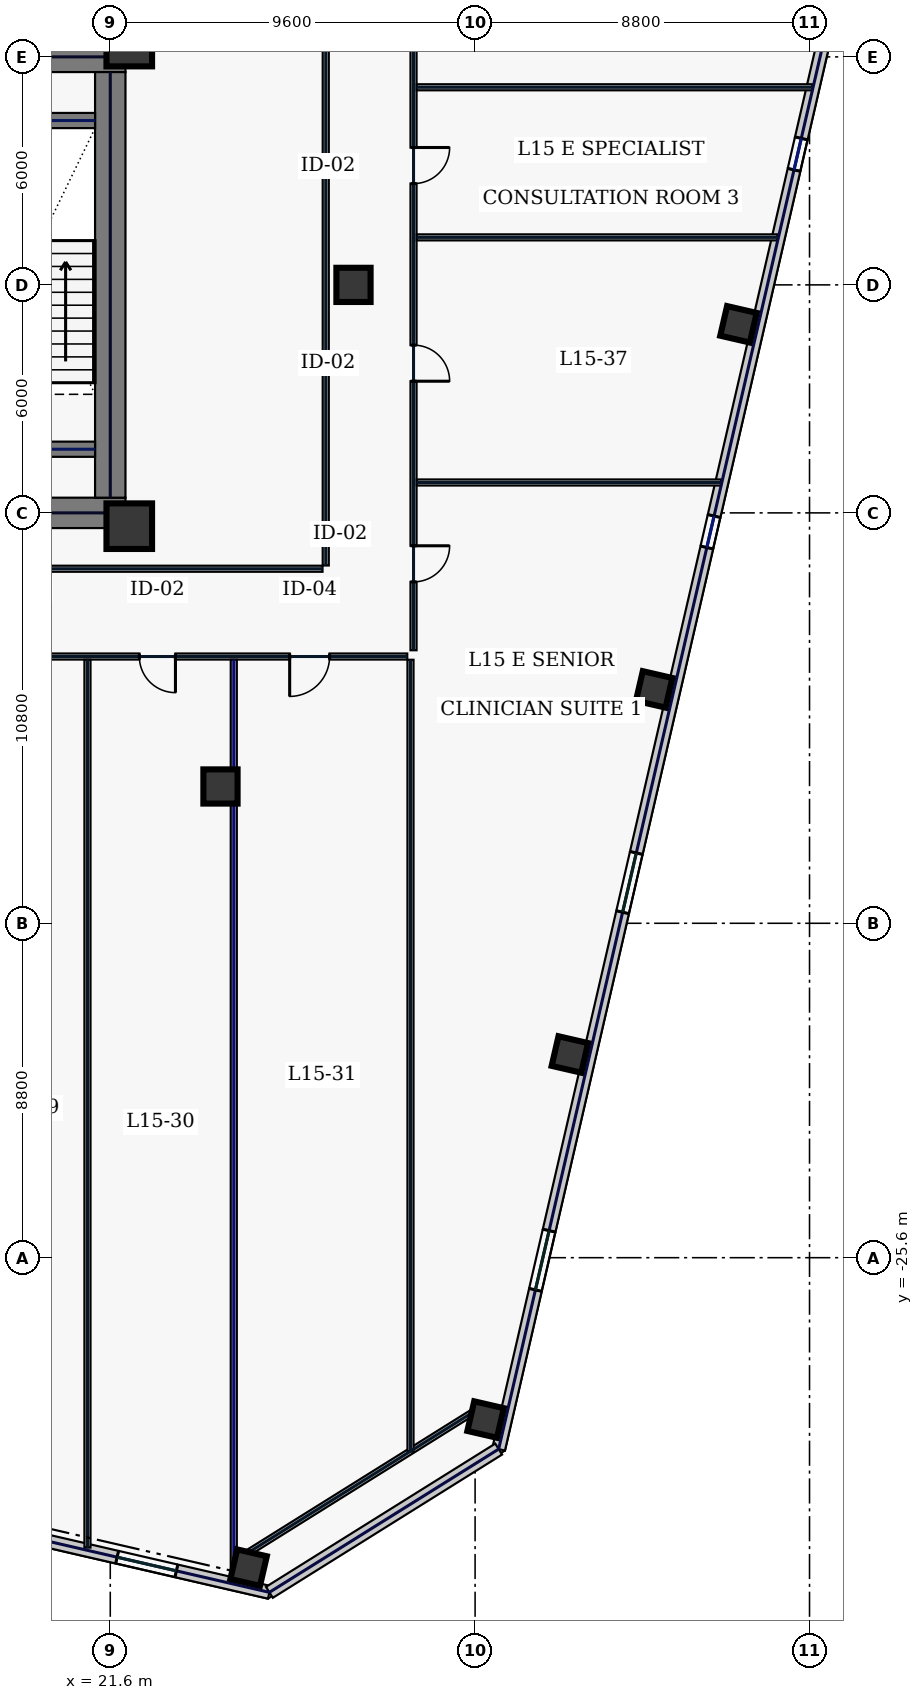
"""IFC4 building model, lengths in metres.
Left out: names, types, materials, properties, quantities, classifications, styles, units other than length and angle.
Written with IfcOpenShell. Run it as: python <this file> out.ifc"""

import sys

from ifc_helpers import new_model, si_unit, direction, frame, frame_2d, origin, origin_2d, place, context, subcontext, project, spatial, rectangle, hollow_rectangle, extrude, element, fill, save


model = new_model("IFC4")
c1 = context("Model", 3, precision=1e-05, world=origin(), true_north=direction((0.0, 1.0)))
c2 = subcontext(c1, "Body", "Model", "MODEL_VIEW")
j1 = project(units=[si_unit("LENGTHUNIT", "METRE"), si_unit("PLANEANGLEUNIT", "RADIAN")], contexts=[c1])
p1 = place(None, origin())
s1 = spatial("IfcSite", under=j1, at=p1, CompositionType="ELEMENT")
p2 = place(p1, origin())
s2 = spatial("IfcBuilding", under=s1, at=p2, CompositionType="ELEMENT")
p3 = place(p2, frame((0.0, 0.0, 71.4)))
s3 = spatial("IfcBuildingStorey", under=s2, at=p3, CompositionType="ELEMENT", Elevation=71.4)
for number, where, z_axis, x_axis in (
    (1, (10.4, 6.0, 0.0), (0.0, 0.0, 1.0), (1.0, 0.0, 0.0)),
    (2, (10.4, -6.0, 0.0), (0.0, 0.0, 1.0), (1.0, 0.0, 0.0)),
):
    element("IfcWall", number, at=place(p3, frame(where, z_axis=z_axis, x_axis=x_axis)), inside=s3, PredefinedType="SHEAR", context=c2, shape_type="SweptSolid", body=[
        extrude(rectangle(XDim=11.6, YDim=0.8, at=frame_2d((5.8, 0.0))), origin(), (0.0, 0.0, 1.0), 3.74),
    ])
p4 = place(p3, frame((21.6, -5.6, 0.0), z_axis=(0.0, 0.0, 1.0), x_axis=(0.0, 1.0, 0.0)))
e3 = element("IfcWall", 3, at=p4, inside=s3, PredefinedType="SHEAR", context=c2, shape_type="SweptSolid", body=[
    extrude(rectangle(XDim=11.2, YDim=0.8, at=frame_2d((5.6, 0.0))), origin(), (0.0, 0.0, 1.0), 3.74),
])
for number, where, z_axis, x_axis in (
    (4, (17.8, -4.325, 0.0), (0.0, 0.0, 1.0), (1.0, 0.0, 0.0)),
    (5, (17.8, 4.325, 0.0), (0.0, 0.0, 1.0), (1.0, 0.0, 0.0)),
):
    element("IfcWall", number, at=place(p3, frame(where, z_axis=z_axis, x_axis=x_axis)), inside=s3, PredefinedType="SHEAR", context=c2, shape_type="SweptSolid", body=[
        extrude(rectangle(XDim=3.4, YDim=0.4, at=frame_2d((1.7, 0.0))), origin(), (0.0, 0.0, 1.0), 3.74),
    ])
for number, where, z_axis, x_axis in (
    (6, (22.1, -6.35, 0.0), (0.0, 0.0, 1.0), (1.0, 0.0, 0.0)),
    (7, (22.1, 6.35, 0.0), (0.0, 0.0, 1.0), (1.0, 0.0, 0.0)),
):
    element("IfcColumn", number, at=place(p3, frame(where, z_axis=z_axis, x_axis=x_axis)), inside=s3, PredefinedType="COLUMN", context=c2, shape_type="SweptSolid", body=[
        extrude(hollow_rectangle(XDim=1.2, YDim=1.2, WallThickness=0.05, at=origin_2d()), origin(), (0.0, 0.0, 1.0), 3.74),
    ])
for number, where, z_axis, x_axis in (
    (8, (24.5, -13.2, 0.0), (0.0, 0.0, 1.0), (1.0, 0.0, 0.0)),
    (9, (28.0, 0.0, 0.0), (0.0, 0.0, 1.0), (1.0, 0.0, 0.0)),
):
    element("IfcColumn", number, at=place(p3, frame(where, z_axis=z_axis, x_axis=x_axis)), inside=s3, PredefinedType="COLUMN", context=c2, shape_type="SweptSolid", body=[
        extrude(hollow_rectangle(XDim=0.9, YDim=0.9, WallThickness=0.04, at=origin_2d()), origin(), (0.0, 0.0, 1.0), 3.74),
    ])
for number, where, z_axis, x_axis in (
    (10, (25.24, -33.757, 0.0), (0.0, 0.0, 1.0), (0.974, -0.225, 0.0)),
    (11, (31.476, -29.86, 0.0), (0.0, 0.0, 1.0), (0.974, -0.225, 0.0)),
    (12, (33.694, -20.252, 0.0), (0.0, 0.0, 1.0), (0.974, -0.225, 0.0)),
    (13, (35.912, -10.645, 0.0), (0.0, 0.0, 1.0), (0.974, -0.225, 0.0)),
    (14, (38.13, -1.038, 0.0), (0.0, 0.0, 1.0), (0.974, -0.225, 0.0)),
):
    element("IfcColumn", number, at=place(p3, frame(where, z_axis=z_axis, x_axis=x_axis)), inside=s3, PredefinedType="COLUMN", context=c2, shape_type="SweptSolid", body=[
        extrude(hollow_rectangle(XDim=0.8, YDim=0.8, WallThickness=0.036, at=origin_2d()), origin(), (0.0, 0.0, 1.0), 3.74),
    ])
p5 = place(p3, frame((3.717, -29.311, 0.0), z_axis=(0.0, 0.0, 1.0), x_axis=(0.97436993772, -0.224951604723, 0.0)))
e15 = element("IfcWall", 15, at=p5, inside=s3, PredefinedType="STANDARD", context=c2, shape_type="SweptSolid", body=[
    extrude(rectangle(XDim=22.651, YDim=0.34, at=frame_2d((11.326, 0.0))), origin(), (0.0, 0.0, 1.0), 3.74),
])
p6 = place(p5, frame((4.306, 0.0, 0.22)))
e16 = element("IfcOpeningElement", 16, at=p6, cuts=e15, PredefinedType="OPENING", context=c2, shape_type="SweptSolid", body=[
    extrude(rectangle(XDim=1.6, YDim=1.2, at=frame_2d((0.8, 0.6))), frame((0.0, 0.18, 0.0), z_axis=(0.0, -1.0, 0.0), x_axis=(1.0, 0.0, 0.0)), (0.0, 0.0, 1.0), 0.36),
])
p7 = place(p5, frame((8.341, 0.0, 0.72)))
e17 = element("IfcOpeningElement", 17, at=p7, cuts=e15, PredefinedType="OPENING", context=c2, shape_type="SweptSolid", body=[
    extrude(rectangle(XDim=0.85, YDim=1.85, at=frame_2d((0.425, 0.925))), frame((0.0, 0.18, 0.0), z_axis=(0.0, -1.0, 0.0), x_axis=(1.0, 0.0, 0.0)), (0.0, 0.0, 1.0), 0.36),
])
p8 = place(p5, frame((15.255, 0.0, 0.72)))
e18 = element("IfcOpeningElement", 18, at=p8, cuts=e15, PredefinedType="OPENING", context=c2, shape_type="SweptSolid", body=[
    extrude(rectangle(XDim=0.85, YDim=1.85, at=frame_2d((0.425, 0.925))), frame((0.0, 0.18, 0.0), z_axis=(0.0, -1.0, 0.0), x_axis=(1.0, 0.0, 0.0)), (0.0, 0.0, 1.0), 0.36),
])
p9 = place(p5, frame((18.539, 0.0, 0.22)))
e19 = element("IfcOpeningElement", 19, at=p9, cuts=e15, PredefinedType="OPENING", context=c2, shape_type="SweptSolid", body=[
    extrude(rectangle(XDim=1.6, YDim=1.2, at=frame_2d((0.8, 0.6))), frame((0.0, 0.18, 0.0), z_axis=(0.0, -1.0, 0.0), x_axis=(1.0, 0.0, 0.0)), (0.0, 0.0, 1.0), 0.36),
])
p10 = place(p3, frame((31.82, -30.637, 0.0), z_axis=(0.0, 0.0, 1.0), x_axis=(0.224949969076, 0.974370315338, 0.0)))
e20 = element("IfcWall", 20, at=p10, inside=s3, PredefinedType="STANDARD", context=c2, shape_type="SweptSolid", body=[
    extrude(rectangle(XDim=40.8, YDim=0.34, at=frame_2d((20.4, 0.0))), origin(), (0.0, 0.0, 1.0), 3.74),
])
p11 = place(p10, frame((4.3, 0.0, 0.58)))
e21 = element("IfcOpeningElement", 21, at=p11, cuts=e20, PredefinedType="OPENING", context=c2, shape_type="SweptSolid", body=[
    extrude(rectangle(XDim=1.6, YDim=2.3, at=frame_2d((0.8, 1.15))), frame((0.0, 0.18, 0.0), z_axis=(0.0, -1.0, 0.0), x_axis=(1.0, 0.0, 0.0)), (0.0, 0.0, 1.0), 0.36),
])
p12 = place(p10, frame((14.5, 0.0, 0.58)))
e22 = element("IfcOpeningElement", 22, at=p12, cuts=e20, PredefinedType="OPENING", context=c2, shape_type="SweptSolid", body=[
    extrude(rectangle(XDim=1.6, YDim=2.3, at=frame_2d((0.8, 1.15))), frame((0.0, 0.18, 0.0), z_axis=(0.0, -1.0, 0.0), x_axis=(1.0, 0.0, 0.0)), (0.0, 0.0, 1.0), 0.36),
])
p13 = place(p10, frame((24.35, 0.0, 0.75)))
e23 = element("IfcOpeningElement", 23, at=p13, cuts=e20, PredefinedType="OPENING", context=c2, shape_type="SweptSolid", body=[
    extrude(rectangle(XDim=0.85, YDim=1.85, at=frame_2d((0.425, 0.925))), frame((0.0, 0.18, 0.0), z_axis=(0.0, -1.0, 0.0), x_axis=(1.0, 0.0, 0.0)), (0.0, 0.0, 1.0), 0.36),
])
p14 = place(p10, frame((34.55, 0.0, 0.75)))
e24 = element("IfcOpeningElement", 24, at=p14, cuts=e20, PredefinedType="OPENING", context=c2, shape_type="SweptSolid", body=[
    extrude(rectangle(XDim=0.85, YDim=1.85, at=frame_2d((0.425, 0.925))), frame((0.0, 0.18, 0.0), z_axis=(0.0, -1.0, 0.0), x_axis=(1.0, 0.0, 0.0)), (0.0, 0.0, 1.0), 0.36),
])
p15 = place(p3, frame((25.788, -34.406, 0.0), z_axis=(0.0, 0.0, 1.0), x_axis=(0.848046504656, 0.529921811158, 0.0)))
e25 = element("IfcWall", 25, at=p15, inside=s3, PredefinedType="STANDARD", context=c2, shape_type="SweptSolid", body=[
    extrude(rectangle(XDim=7.113, YDim=0.34, at=frame_2d((3.557, 0.0))), origin(), (0.0, 0.0, 1.0), 3.74),
])
p16 = place(p3, frame((25.06, -33.468, 0.0), z_axis=(0.0, 0.0, 1.0), x_axis=(0.848043064089, 0.529927317139, 0.0)))
e26 = element("IfcWall", 26, at=p16, inside=s3, PredefinedType="PARTITIONING", context=c2, shape_type="SweptSolid", body=[
    extrude(rectangle(XDim=7.354, YDim=0.16, at=frame_2d((3.677, 0.0))), origin(), (0.0, 0.0, 1.0), 3.74),
])
p17 = place(p3, frame((29.58, 9.665, 0.0), z_axis=(0.0, 0.0, 1.0), x_axis=(0.0, -1.0, 0.0)))
e27 = element("IfcWall", 27, at=p17, inside=s3, PredefinedType="PARTITIONING", context=c2, shape_type="SweptSolid", body=[
    extrude(rectangle(XDim=19.28, YDim=0.16, at=frame_2d((9.64, 0.0))), origin(), (0.0, 0.0, 1.0), 3.74),
])
p18 = place(p17, frame((16.531, 0.0, 0.0)))
e28 = element("IfcOpeningElement", 28, at=p18, cuts=e27, PredefinedType="OPENING", context=c2, shape_type="SweptSolid", body=[
    extrude(rectangle(XDim=0.95, YDim=2.2, at=frame_2d((0.475, 1.1))), frame((0.0, 0.09, 0.0), z_axis=(0.0, -1.0, 0.0), x_axis=(1.0, 0.0, 0.0)), (0.0, 0.0, 1.0), 0.18),
])
p19 = place(p17, frame((11.25, 0.0, 0.0)))
e29 = element("IfcOpeningElement", 29, at=p19, cuts=e27, PredefinedType="OPENING", context=c2, shape_type="SweptSolid", body=[
    extrude(rectangle(XDim=0.95, YDim=2.2, at=frame_2d((0.475, 1.1))), frame((0.0, 0.09, 0.0), z_axis=(0.0, -1.0, 0.0), x_axis=(1.0, 0.0, 0.0)), (0.0, 0.0, 1.0), 0.18),
])
p20 = place(p17, frame((6.05, 0.0, 0.0)))
e30 = element("IfcOpeningElement", 30, at=p20, cuts=e27, PredefinedType="OPENING", context=c2, shape_type="SweptSolid", body=[
    extrude(rectangle(XDim=0.95, YDim=2.2, at=frame_2d((0.475, 1.1))), frame((0.0, 0.09, 0.0), z_axis=(0.0, -1.0, 0.0), x_axis=(1.0, 0.0, 0.0)), (0.0, 0.0, 1.0), 0.18),
])
p21 = place(p17, frame((1.994, 0.0, 0.0)))
e31 = element("IfcOpeningElement", 31, at=p21, cuts=e27, PredefinedType="OPENING", context=c2, shape_type="SweptSolid", body=[
    extrude(rectangle(XDim=0.95, YDim=2.2, at=frame_2d((0.475, 1.1))), frame((0.0, 0.09, 0.0), z_axis=(0.0, -1.0, 0.0), x_axis=(1.0, 0.0, 0.0)), (0.0, 0.0, 1.0), 0.18),
])
p22 = place(p3, frame((29.415, -9.78, 0.0), z_axis=(0.0, 0.0, 1.0), x_axis=(-1.0, 0.0, 0.0)))
e32 = element("IfcWall", 32, at=p22, inside=s3, PredefinedType="PARTITIONING", context=c2, shape_type="SweptSolid", body=[
    extrude(rectangle(XDim=50.65, YDim=0.16, at=frame_2d((25.325, 0.0))), origin(), (0.0, 0.0, 1.0), 3.74),
])
p23 = place(p22, frame((40.5, 0.0, 0.0)))
e33 = element("IfcOpeningElement", 33, at=p23, cuts=e32, PredefinedType="OPENING", context=c2, shape_type="SweptSolid", body=[
    extrude(rectangle(XDim=0.95, YDim=2.2, at=frame_2d((0.475, 1.1))), frame((0.0, 0.09, 0.0), z_axis=(0.0, -1.0, 0.0), x_axis=(1.0, 0.0, 0.0)), (0.0, 0.0, 1.0), 0.18),
])
p24 = place(p22, frame((33.52, 0.0, 0.0)))
e34 = element("IfcOpeningElement", 34, at=p24, cuts=e32, PredefinedType="OPENING", context=c2, shape_type="SweptSolid", body=[
    extrude(rectangle(XDim=0.95, YDim=2.2, at=frame_2d((0.475, 1.1))), frame((0.0, 0.09, 0.0), z_axis=(0.0, -1.0, 0.0), x_axis=(1.0, 0.0, 0.0)), (0.0, 0.0, 1.0), 0.18),
])
p25 = place(p22, frame((26.525, 0.0, 0.0)))
e35 = element("IfcOpeningElement", 35, at=p25, cuts=e32, PredefinedType="OPENING", context=c2, shape_type="SweptSolid", body=[
    extrude(rectangle(XDim=0.95, YDim=2.2, at=frame_2d((0.475, 1.1))), frame((0.0, 0.09, 0.0), z_axis=(0.0, -1.0, 0.0), x_axis=(1.0, 0.0, 0.0)), (0.0, 0.0, 1.0), 0.18),
])
p26 = place(p22, frame((20.75, 0.0, 0.0)))
e36 = element("IfcOpeningElement", 36, at=p26, cuts=e32, PredefinedType="OPENING", context=c2, shape_type="SweptSolid", body=[
    extrude(rectangle(XDim=1.05, YDim=2.2, at=frame_2d((0.525, 1.1))), frame((0.0, 0.09, 0.0), z_axis=(0.0, -1.0, 0.0), x_axis=(1.0, 0.0, 0.0)), (0.0, 0.0, 1.0), 0.18),
])
p27 = place(p22, frame((17.05, 0.0, 0.0)))
e37 = element("IfcOpeningElement", 37, at=p27, cuts=e32, PredefinedType="OPENING", context=c2, shape_type="SweptSolid", body=[
    extrude(rectangle(XDim=0.95, YDim=2.2, at=frame_2d((0.475, 1.1))), frame((0.0, 0.09, 0.0), z_axis=(0.0, -1.0, 0.0), x_axis=(1.0, 0.0, 0.0)), (0.0, 0.0, 1.0), 0.18),
])
p28 = place(p22, frame((13.35, 0.0, 0.0)))
e38 = element("IfcOpeningElement", 38, at=p28, cuts=e32, PredefinedType="OPENING", context=c2, shape_type="SweptSolid", body=[
    extrude(rectangle(XDim=1.15, YDim=2.2, at=frame_2d((0.575, 1.1))), frame((0.0, 0.09, 0.0), z_axis=(0.0, -1.0, 0.0), x_axis=(1.0, 0.0, 0.0)), (0.0, 0.0, 1.0), 0.18),
])
p29 = place(p22, frame((9.65, 0.0, 0.0)))
e39 = element("IfcOpeningElement", 39, at=p29, cuts=e32, PredefinedType="OPENING", context=c2, shape_type="SweptSolid", body=[
    extrude(rectangle(XDim=0.95, YDim=2.2, at=frame_2d((0.475, 1.1))), frame((0.0, 0.09, 0.0), z_axis=(0.0, -1.0, 0.0), x_axis=(1.0, 0.0, 0.0)), (0.0, 0.0, 1.0), 0.18),
])
p30 = place(p22, frame((6.1, 0.0, 0.0)))
e40 = element("IfcOpeningElement", 40, at=p30, cuts=e32, PredefinedType="OPENING", context=c2, shape_type="SweptSolid", body=[
    extrude(rectangle(XDim=0.95, YDim=2.2, at=frame_2d((0.475, 1.1))), frame((0.0, 0.09, 0.0), z_axis=(0.0, -1.0, 0.0), x_axis=(1.0, 0.0, 0.0)), (0.0, 0.0, 1.0), 0.18),
])
p31 = place(p22, frame((2.044, 0.0, 0.0)))
e41 = element("IfcOpeningElement", 41, at=p31, cuts=e32, PredefinedType="OPENING", context=c2, shape_type="SweptSolid", body=[
    extrude(rectangle(XDim=1.05, YDim=2.2, at=frame_2d((0.525, 1.1))), frame((0.0, 0.09, 0.0), z_axis=(0.0, -1.0, 0.0), x_axis=(1.0, 0.0, 0.0)), (0.0, 0.0, 1.0), 0.18),
])
p32 = place(p3, frame((10.665, -7.47, 0.0), z_axis=(0.0, 0.0, 1.0), x_axis=(1.0, 0.0, 0.0)))
e42 = element("IfcWall", 42, at=p32, inside=s3, PredefinedType="PARTITIONING", context=c2, shape_type="SweptSolid", body=[
    extrude(rectangle(XDim=16.52, YDim=0.16, at=frame_2d((8.26, 0.0))), origin(), (0.0, 0.0, 1.0), 3.74),
])
p33 = place(p3, frame((27.27, -7.385, 0.0), z_axis=(0.0, 0.0, 1.0), x_axis=(0.0, 1.0, 0.0)))
e43 = element("IfcWall", 43, at=p33, inside=s3, PredefinedType="PARTITIONING", context=c2, shape_type="SweptSolid", body=[
    extrude(rectangle(XDim=14.82, YDim=0.16, at=frame_2d((7.41, 0.0))), origin(), (0.0, 0.0, 1.0), 3.74),
])
p34 = place(p3, frame((29.5, -30.703, 0.0), z_axis=(0.0, 0.0, 1.0), x_axis=(0.0, 1.0, 0.0)))
e44 = element("IfcWall", 44, at=p34, inside=s3, PredefinedType="PARTITIONING", context=c2, shape_type="SweptSolid", body=[
    extrude(rectangle(XDim=20.838, YDim=0.16, at=frame_2d((10.419, 0.0))), origin(), (0.0, 0.0, 1.0), 3.74),
])
p35 = place(p3, frame((21.0, -33.229, 0.0), z_axis=(0.0, 0.0, 1.0), x_axis=(0.0, 1.0, 0.0)))
e45 = element("IfcWall", 45, at=p35, inside=s3, PredefinedType="PARTITIONING", context=c2, shape_type="SweptSolid", body=[
    extrude(rectangle(XDim=23.365, YDim=0.16, at=frame_2d((11.682, 0.0))), origin(), (0.0, 0.0, 1.0), 3.74),
])
p36 = place(p3, frame((24.85, -34.118, 0.0), z_axis=(0.0, 0.0, 1.0), x_axis=(0.0, 1.0, 0.0)))
e46 = element("IfcWall", 46, at=p36, inside=s3, PredefinedType="PARTITIONING", context=c2, shape_type="SweptSolid", body=[
    extrude(rectangle(XDim=24.253, YDim=0.16, at=frame_2d((12.126, 0.0))), origin(), (0.0, 0.0, 1.0), 3.235),
])
p37 = place(p3, frame((29.665, -5.2, 0.0), z_axis=(0.0, 0.0, 1.0), x_axis=(1.0, 0.0, 0.0)))
e47 = element("IfcWall", 47, at=p37, inside=s3, PredefinedType="PARTITIONING", context=c2, shape_type="SweptSolid", body=[
    extrude(rectangle(XDim=8.007, YDim=0.16, at=frame_2d((4.003, 0.0))), origin(), (0.0, 0.0, 1.0), 3.74),
])
p38 = place(p3, frame((29.665, 1.25, 0.0), z_axis=(0.0, 0.0, 1.0), x_axis=(1.0, 0.0, 0.0)))
e48 = element("IfcWall", 48, at=p38, inside=s3, PredefinedType="PARTITIONING", context=c2, shape_type="SweptSolid", body=[
    extrude(rectangle(XDim=9.496, YDim=0.16, at=frame_2d((4.748, 0.0))), origin(), (0.0, 0.0, 1.0), 3.74),
])
p39 = place(p3, frame((29.665, 5.2, 0.0), z_axis=(0.0, 0.0, 1.0), x_axis=(1.0, 0.0, 0.0)))
e49 = element("IfcWall", 49, at=p39, inside=s3, PredefinedType="PARTITIONING", context=c2, shape_type="SweptSolid", body=[
    extrude(rectangle(XDim=10.408, YDim=0.16, at=frame_2d((5.204, 0.0))), origin(), (0.0, 0.0, 1.0), 3.74),
])
p40 = place(p9, origin())
e50 = element("IfcWindow", 50, at=p40, inside=s3, PartitioningType="SINGLE_PANEL", PredefinedType="WINDOW", context=c2, shape_type="SweptSolid", body=[
    extrude(rectangle(XDim=1.6, YDim=1.2, at=frame_2d((0.8, 0.6))), frame((0.0, 0.03, 0.0), z_axis=(0.0, -1.0, 0.0), x_axis=(1.0, 0.0, 0.0)), (0.0, 0.0, 1.0), 0.06),
])
fill(e19, e50)
p41 = place(p11, origin())
e51 = element("IfcWindow", 51, at=p41, inside=s3, PartitioningType="SINGLE_PANEL", PredefinedType="WINDOW", context=c2, shape_type="SweptSolid", body=[
    extrude(rectangle(XDim=1.6, YDim=2.3, at=frame_2d((0.8, 1.15))), frame((0.0, 0.03, 0.0), z_axis=(0.0, -1.0, 0.0), x_axis=(1.0, 0.0, 0.0)), (0.0, 0.0, 1.0), 0.06),
])
fill(e21, e51)
p42 = place(p12, origin())
e52 = element("IfcWindow", 52, at=p42, inside=s3, PartitioningType="SINGLE_PANEL", PredefinedType="WINDOW", context=c2, shape_type="SweptSolid", body=[
    extrude(rectangle(XDim=1.6, YDim=2.3, at=frame_2d((0.8, 1.15))), frame((0.0, 0.03, 0.0), z_axis=(0.0, -1.0, 0.0), x_axis=(1.0, 0.0, 0.0)), (0.0, 0.0, 1.0), 0.06),
])
fill(e22, e52)
p43 = place(p13, origin())
e53 = element("IfcWindow", 53, at=p43, inside=s3, PartitioningType="SINGLE_PANEL", PredefinedType="WINDOW", context=c2, shape_type="SweptSolid", body=[
    extrude(rectangle(XDim=0.85, YDim=1.85, at=frame_2d((0.425, 0.925))), frame((0.0, 0.03, 0.0), z_axis=(0.0, -1.0, 0.0), x_axis=(1.0, 0.0, 0.0)), (0.0, 0.0, 1.0), 0.06),
])
fill(e23, e53)
p44 = place(p14, origin())
e54 = element("IfcWindow", 54, at=p44, inside=s3, PartitioningType="SINGLE_PANEL", PredefinedType="WINDOW", context=c2, shape_type="SweptSolid", body=[
    extrude(rectangle(XDim=0.85, YDim=1.85, at=frame_2d((0.425, 0.925))), frame((0.0, 0.03, 0.0), z_axis=(0.0, -1.0, 0.0), x_axis=(1.0, 0.0, 0.0)), (0.0, 0.0, 1.0), 0.06),
])
fill(e24, e54)
p45 = place(p30, origin())
e55 = element("IfcDoor", 55, at=p45, inside=s3, OperationType="SINGLE_SWING_LEFT", PredefinedType="DOOR", context=c2, shape_type="SweptSolid", body=[
    extrude(rectangle(XDim=0.95, YDim=2.2, at=frame_2d((0.475, 1.1))), frame((0.0, 0.025, 0.0), z_axis=(0.0, -1.0, 0.0), x_axis=(1.0, 0.0, 0.0)), (0.0, 0.0, 1.0), 0.05),
])
fill(e40, e55)
p46 = place(p31, origin())
e56 = element("IfcDoor", 56, at=p46, inside=s3, OperationType="SINGLE_SWING_RIGHT", PredefinedType="DOOR", context=c2, shape_type="SweptSolid", body=[
    extrude(rectangle(XDim=1.05, YDim=2.2, at=frame_2d((0.525, 1.1))), frame((0.0, 0.025, 0.0), z_axis=(0.0, -1.0, 0.0), x_axis=(1.0, 0.0, 0.0)), (0.0, 0.0, 1.0), 0.05),
])
fill(e41, e56)
p47 = place(p18, origin())
e57 = element("IfcDoor", 57, at=p47, inside=s3, OperationType="SINGLE_SWING_LEFT", PredefinedType="DOOR", context=c2, shape_type="SweptSolid", body=[
    extrude(rectangle(XDim=0.95, YDim=2.2, at=frame_2d((0.475, 1.1))), frame((0.0, 0.025, 0.0), z_axis=(0.0, -1.0, 0.0), x_axis=(1.0, 0.0, 0.0)), (0.0, 0.0, 1.0), 0.05),
])
fill(e28, e57)
p48 = place(p19, origin())
e58 = element("IfcDoor", 58, at=p48, inside=s3, OperationType="SINGLE_SWING_RIGHT", PredefinedType="DOOR", context=c2, shape_type="SweptSolid", body=[
    extrude(rectangle(XDim=0.95, YDim=2.2, at=frame_2d((0.475, 1.1))), frame((0.0, 0.025, 0.0), z_axis=(0.0, -1.0, 0.0), x_axis=(1.0, 0.0, 0.0)), (0.0, 0.0, 1.0), 0.05),
])
fill(e29, e58)
p49 = place(p20, origin())
e59 = element("IfcDoor", 59, at=p49, inside=s3, OperationType="SINGLE_SWING_LEFT", PredefinedType="DOOR", context=c2, shape_type="SweptSolid", body=[
    extrude(rectangle(XDim=0.95, YDim=2.2, at=frame_2d((0.475, 1.1))), frame((0.0, 0.025, 0.0), z_axis=(0.0, -1.0, 0.0), x_axis=(1.0, 0.0, 0.0)), (0.0, 0.0, 1.0), 0.05),
])
fill(e30, e59)
save(model, sys.argv[1])
